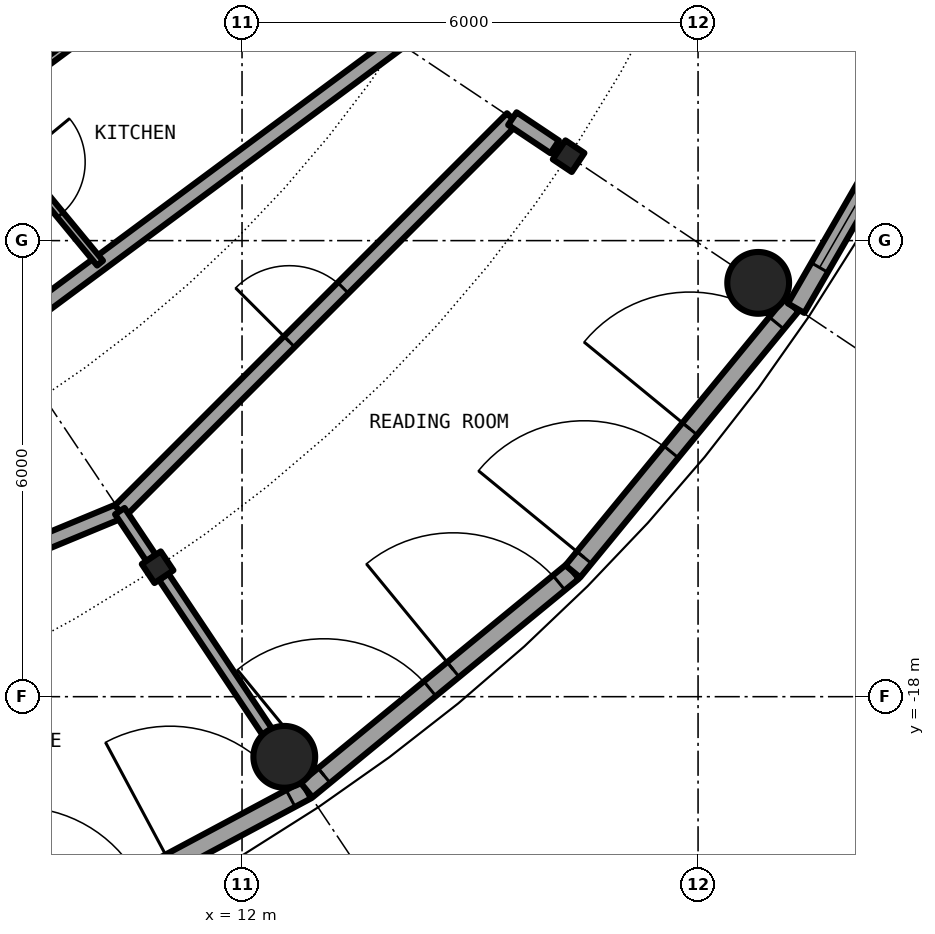
"""IFC4 building model, lengths in metres.
Left out: names, types, materials, properties, quantities, classifications, styles, units other than length and angle.
Written with IfcOpenShell. Run it as: python <this file> out.ifc"""

import sys

from ifc_helpers import new_model, si_unit, direction, frame, frame_2d, origin, origin_2d, place, context, subcontext, project, spatial, rectangle, hollow_circle, i_section, extrude, element, fill, save


model = new_model("IFC4")
c1 = context("Model", 3, precision=1e-05, world=origin(), true_north=direction((0.0, 1.0)))
c2 = subcontext(c1, "Body", "Model", "MODEL_VIEW")
j1 = project(units=[si_unit("LENGTHUNIT", "METRE"), si_unit("PLANEANGLEUNIT", "RADIAN")], contexts=[c1])
p1 = place(None, origin())
s1 = spatial("IfcSite", under=j1, at=p1, CompositionType="ELEMENT")
p2 = place(p1, origin())
s2 = spatial("IfcBuilding", under=s1, at=p2, CompositionType="ELEMENT")
p3 = place(p2, frame((0.0, 0.0, 249.3)))
s3 = spatial("IfcBuildingStorey", under=s2, at=p3, CompositionType="ELEMENT", Elevation=249.3)
for number, where, z_axis, x_axis in (
    (1, (12.556, -18.791, 0.0), (0.0, 0.0, 1.0), (1.0, 0.0, 0.0)),
    (2, (18.791, -12.556, 0.0), (0.0, 0.0, 1.0), (1.0, 0.0, 0.0)),
):
    element("IfcColumn", number, at=place(p3, frame(where, z_axis=z_axis, x_axis=x_axis)), inside=s3, PredefinedType="COLUMN", context=c2, shape_type="SweptSolid", body=[
        extrude(hollow_circle(Radius=0.406, WallThickness=0.03, at=origin_2d()), origin(), (0.0, 0.0, 1.0), 3.05),
    ])
for number, where, z_axis, x_axis in (
    (3, (10.889, -16.297, 0.0), (0.0, 0.0, 1.0), (0.556, -0.831, 0.0)),
    (4, (16.297, -10.889, 0.0), (0.0, 0.0, 1.0), (0.831, -0.556, 0.0)),
):
    element("IfcColumn", number, at=place(p3, frame(where, z_axis=z_axis, x_axis=x_axis)), inside=s3, PredefinedType="COLUMN", context=c2, shape_type="SweptSolid", body=[
        extrude(i_section(OverallWidth=0.3, OverallDepth=0.3, WebThickness=0.011, FlangeThickness=0.019, FilletRadius=0.027, at=origin_2d()), origin(), (0.0, 0.0, 1.0), 3.05),
    ])
p4 = place(p3, frame((8.85, -21.365, 0.0), z_axis=(0.0, 0.0, 1.0), x_axis=(0.881912752543, 0.471412660947, 0.0)))
e5 = element("IfcWall", 5, at=p4, inside=s3, PredefinedType="SOLIDWALL", context=c2, shape_type="SweptSolid", body=[
    extrude(rectangle(XDim=4.533, YDim=0.25, at=frame_2d((2.267, 0.0))), origin(), (0.0, 0.0, 1.0), 2.7),
])
p5 = place(p4, frame((0.236, 0.0, 0.0)))
e6 = element("IfcOpeningElement", 6, at=p5, cuts=e5, PredefinedType="OPENING", context=c2, shape_type="SweptSolid", body=[
    extrude(rectangle(XDim=1.8, YDim=2.2, at=frame_2d((0.9, 1.1))), frame((0.0, 0.135, 0.0), z_axis=(0.0, -1.0, 0.0), x_axis=(1.0, 0.0, 0.0)), (0.0, 0.0, 1.0), 0.27),
])
p6 = place(p4, frame((2.497, 0.0, 0.0)))
e7 = element("IfcOpeningElement", 7, at=p6, cuts=e5, PredefinedType="OPENING", context=c2, shape_type="SweptSolid", body=[
    extrude(rectangle(XDim=1.8, YDim=2.2, at=frame_2d((0.9, 1.1))), frame((0.0, 0.135, 0.0), z_axis=(0.0, -1.0, 0.0), x_axis=(1.0, 0.0, 0.0)), (0.0, 0.0, 1.0), 0.27),
])
p7 = place(p3, frame((12.848, -19.228, 0.0), z_axis=(0.0, 0.0, 1.0), x_axis=(0.772989395532, 0.634418942337, 0.0)))
e8 = element("IfcWall", 8, at=p7, inside=s3, PredefinedType="SOLIDWALL", context=c2, shape_type="SweptSolid", body=[
    extrude(rectangle(XDim=4.533, YDim=0.25, at=frame_2d((2.267, 0.0))), origin(), (0.0, 0.0, 1.0), 2.7),
])
p8 = place(p7, frame((0.3, 0.0, 0.0)))
e9 = element("IfcOpeningElement", 9, at=p8, cuts=e8, PredefinedType="OPENING", context=c2, shape_type="SweptSolid", body=[
    extrude(rectangle(XDim=1.8, YDim=2.2, at=frame_2d((0.9, 1.1))), frame((0.0, 0.135, 0.0), z_axis=(0.0, -1.0, 0.0), x_axis=(1.0, 0.0, 0.0)), (0.0, 0.0, 1.0), 0.27),
])
p9 = place(p7, frame((2.497, 0.0, 0.0)))
e10 = element("IfcOpeningElement", 10, at=p9, cuts=e8, PredefinedType="OPENING", context=c2, shape_type="SweptSolid", body=[
    extrude(rectangle(XDim=1.8, YDim=2.2, at=frame_2d((0.9, 1.1))), frame((0.0, 0.135, 0.0), z_axis=(0.0, -1.0, 0.0), x_axis=(1.0, 0.0, 0.0)), (0.0, 0.0, 1.0), 0.27),
])
p10 = place(p3, frame((16.352, -16.352, 0.0), z_axis=(0.0, 0.0, 1.0), x_axis=(0.634418942337, 0.772989395532, 0.0)))
e11 = element("IfcWall", 11, at=p10, inside=s3, PredefinedType="SOLIDWALL", context=c2, shape_type="SweptSolid", body=[
    extrude(rectangle(XDim=4.533, YDim=0.25, at=frame_2d((2.267, 0.0))), origin(), (0.0, 0.0, 1.0), 2.7),
])
p11 = place(p10, frame((0.236, 0.0, 0.0)))
e12 = element("IfcOpeningElement", 12, at=p11, cuts=e11, PredefinedType="OPENING", context=c2, shape_type="SweptSolid", body=[
    extrude(rectangle(XDim=1.8, YDim=2.2, at=frame_2d((0.9, 1.1))), frame((0.0, 0.135, 0.0), z_axis=(0.0, -1.0, 0.0), x_axis=(1.0, 0.0, 0.0)), (0.0, 0.0, 1.0), 0.27),
])
p12 = place(p10, frame((2.427, 0.0, 0.0)))
e13 = element("IfcOpeningElement", 13, at=p12, cuts=e11, PredefinedType="OPENING", context=c2, shape_type="SweptSolid", body=[
    extrude(rectangle(XDim=1.8, YDim=2.2, at=frame_2d((0.9, 1.1))), frame((0.0, 0.135, 0.0), z_axis=(0.0, -1.0, 0.0), x_axis=(1.0, 0.0, 0.0)), (0.0, 0.0, 1.0), 0.27),
])
p13 = place(p3, frame((19.29, -12.889, 0.0), z_axis=(0.0, 0.0, 1.0), x_axis=(0.499903546559, 0.866081084043, 0.0)))
e14 = element("IfcWall", 14, at=p13, inside=s3, PredefinedType="SOLIDWALL", context=c2, shape_type="SweptSolid", body=[
    extrude(rectangle(XDim=3.034, YDim=0.25, at=frame_2d((1.517, 0.0))), origin(), (0.0, 0.0, 1.0), 2.7),
])
p14 = place(p13, frame((0.617, 0.0, 0.3)))
e15 = element("IfcOpeningElement", 15, at=p14, cuts=e14, PredefinedType="OPENING", context=c2, shape_type="SweptSolid", body=[
    extrude(rectangle(XDim=1.8, YDim=2.1, at=frame_2d((0.9, 1.05))), frame((0.0, 0.135, 0.0), z_axis=(0.0, -1.0, 0.0), x_axis=(1.0, 0.0, 0.0)), (0.0, 0.0, 1.0), 0.27),
])
p15 = place(p3, frame((3.65, -18.351, 0.0), z_axis=(0.0, 0.0, 1.0), x_axis=(0.923866436038, 0.382715048518, 0.0)))
e16 = element("IfcWall", 16, at=p15, inside=s3, PredefinedType="PARTITIONING", context=c2, shape_type="SweptSolid", body=[
    extrude(rectangle(XDim=7.301, YDim=0.2, at=frame_2d((3.65, 0.0))), origin(), (0.0, 0.0, 1.0), 2.7),
])
p16 = place(p15, frame((3.15, 0.0, 0.0)))
e17 = element("IfcOpeningElement", 17, at=p16, cuts=e16, PredefinedType="OPENING", context=c2, shape_type="SweptSolid", body=[
    extrude(rectangle(XDim=1.0, YDim=2.3, at=frame_2d((0.5, 1.15))), frame((0.0, 0.11, 0.0), z_axis=(0.0, -1.0, 0.0), x_axis=(1.0, 0.0, 0.0)), (0.0, 0.0, 1.0), 0.22),
])
p17 = place(p3, frame((10.395, -15.557, 0.0), z_axis=(0.0, 0.0, 1.0), x_axis=(0.707106781187, 0.707106781187, 0.0)))
e18 = element("IfcWall", 18, at=p17, inside=s3, PredefinedType="PARTITIONING", context=c2, shape_type="SweptSolid", body=[
    extrude(rectangle(XDim=7.3, YDim=0.2, at=frame_2d((3.65, 0.0))), origin(), (0.0, 0.0, 1.0), 2.7),
])
p18 = place(p17, frame((3.15, 0.0, 0.0)))
e19 = element("IfcOpeningElement", 19, at=p18, cuts=e18, PredefinedType="OPENING", context=c2, shape_type="SweptSolid", body=[
    extrude(rectangle(XDim=1.0, YDim=2.3, at=frame_2d((0.5, 1.15))), frame((0.0, 0.11, 0.0), z_axis=(0.0, -1.0, 0.0), x_axis=(1.0, 0.0, 0.0)), (0.0, 0.0, 1.0), 0.22),
])
p19 = place(p3, frame((4.906, -16.172, 0.0), z_axis=(0.0, 0.0, 1.0), x_axis=(0.803204584823, 0.59570327758, 0.0)))
e20 = element("IfcWall", 20, at=p19, inside=s3, PredefinedType="PARTITIONING", context=c2, shape_type="SweptSolid", body=[
    extrude(rectangle(XDim=11.387, YDim=0.2, at=frame_2d((5.693, 0.0))), origin(), (0.0, 0.0, 1.0), 2.7),
])
p20 = place(p19, frame((4.38, 0.0, 0.0)))
e21 = element("IfcOpeningElement", 21, at=p20, cuts=e20, PredefinedType="OPENING", context=c2, shape_type="SweptSolid", body=[
    extrude(rectangle(XDim=1.0, YDim=2.3, at=frame_2d((0.5, 1.15))), frame((0.0, 0.11, 0.0), z_axis=(0.0, -1.0, 0.0), x_axis=(1.0, 0.0, 0.0)), (0.0, 0.0, 1.0), 0.22),
])
p21 = place(p3, frame((8.513, -10.332, 0.0), z_axis=(0.0, 0.0, 1.0), x_axis=(0.803224407806, 0.595676548728, 0.0)))
e22 = element("IfcWall", 22, at=p21, inside=s3, PredefinedType="PARTITIONING", context=c2, shape_type="SweptSolid", body=[
    extrude(rectangle(XDim=2.236, YDim=0.1, at=frame_2d((1.118, 0.0))), origin(), (0.0, 0.0, 1.0), 2.7),
])
p22 = place(p3, frame((4.908, -5.959, 0.0), z_axis=(0.0, 0.0, 1.0), x_axis=(0.636105207978, -0.771602335652, 0.0)))
e23 = element("IfcWall", 23, at=p22, inside=s3, PredefinedType="PARTITIONING", context=c2, shape_type="SweptSolid", body=[
    extrude(rectangle(XDim=8.213, YDim=0.1, at=frame_2d((4.106, 0.0))), origin(), (0.0, 0.0, 1.0), 2.7),
])
p23 = place(p22, frame((6.49, 0.0, 0.0)))
e24 = element("IfcOpeningElement", 24, at=p23, cuts=e23, PredefinedType="OPENING", context=c2, shape_type="SweptSolid", body=[
    extrude(rectangle(XDim=0.9, YDim=2.3, at=frame_2d((0.45, 1.15))), frame((0.0, 0.06, 0.0), z_axis=(0.0, -1.0, 0.0), x_axis=(1.0, 0.0, 0.0)), (0.0, 0.0, 1.0), 0.12),
])
p24 = place(p22, frame((2.384, 0.0, 0.0)))
e25 = element("IfcOpeningElement", 25, at=p24, cuts=e23, PredefinedType="OPENING", context=c2, shape_type="SweptSolid", body=[
    extrude(rectangle(XDim=0.9, YDim=2.3, at=frame_2d((0.45, 1.15))), frame((0.0, 0.06, 0.0), z_axis=(0.0, -1.0, 0.0), x_axis=(1.0, 0.0, 0.0)), (0.0, 0.0, 1.0), 0.12),
])
p25 = place(p3, frame((10.392, -15.559, 0.0), z_axis=(0.0, 0.0, 1.0), x_axis=(0.555537830231, -0.831491262241, 0.0)))
e26 = element("IfcWall", 26, at=p25, inside=s3, PredefinedType="PARTITIONING", context=c2, shape_type="SweptSolid", body=[
    extrude(rectangle(XDim=0.74, YDim=0.15, at=frame_2d((0.37, 0.0))), origin(), (0.0, 0.0, 1.0), 2.7),
])
p26 = place(p3, frame((10.97, -16.423, 0.0), z_axis=(0.0, 0.0, 1.0), x_axis=(0.555504160879, -0.831513756498, 0.0)))
e27 = element("IfcWall", 27, at=p26, inside=s3, PredefinedType="PARTITIONING", context=c2, shape_type="SweptSolid", body=[
    extrude(rectangle(XDim=2.452, YDim=0.15, at=frame_2d((1.226, 0.0))), origin(), (0.0, 0.0, 1.0), 2.7),
])
p27 = place(p3, frame((15.557, -10.395, 0.0), z_axis=(0.0, 0.0, 1.0), x_axis=(0.831601508083, -0.555372786292, 0.0)))
e28 = element("IfcWall", 28, at=p27, inside=s3, PredefinedType="PARTITIONING", context=c2, shape_type="SweptSolid", body=[
    extrude(rectangle(XDim=0.67, YDim=0.2, at=frame_2d((0.335, 0.0))), origin(), (0.0, 0.0, 1.0), 2.7),
])
p28 = place(p6, origin())
e29 = element("IfcDoor", 29, at=p28, inside=s3, OperationType="SINGLE_SWING_LEFT", PredefinedType="DOOR", context=c2, shape_type="SweptSolid", body=[
    extrude(rectangle(XDim=1.8, YDim=2.2, at=frame_2d((0.9, 1.1))), frame((0.0, 0.025, 0.0), z_axis=(0.0, -1.0, 0.0), x_axis=(1.0, 0.0, 0.0)), (0.0, 0.0, 1.0), 0.05),
])
fill(e7, e29)
p29 = place(p8, origin())
e30 = element("IfcDoor", 30, at=p29, inside=s3, OperationType="SINGLE_SWING_LEFT", PredefinedType="DOOR", context=c2, shape_type="SweptSolid", body=[
    extrude(rectangle(XDim=1.8, YDim=2.2, at=frame_2d((0.9, 1.1))), frame((0.0, 0.025, 0.0), z_axis=(0.0, -1.0, 0.0), x_axis=(1.0, 0.0, 0.0)), (0.0, 0.0, 1.0), 0.05),
])
fill(e9, e30)
p30 = place(p9, origin())
e31 = element("IfcDoor", 31, at=p30, inside=s3, OperationType="SINGLE_SWING_LEFT", PredefinedType="DOOR", context=c2, shape_type="SweptSolid", body=[
    extrude(rectangle(XDim=1.8, YDim=2.2, at=frame_2d((0.9, 1.1))), frame((0.0, 0.025, 0.0), z_axis=(0.0, -1.0, 0.0), x_axis=(1.0, 0.0, 0.0)), (0.0, 0.0, 1.0), 0.05),
])
fill(e10, e31)
p31 = place(p11, origin())
e32 = element("IfcDoor", 32, at=p31, inside=s3, OperationType="SINGLE_SWING_LEFT", PredefinedType="DOOR", context=c2, shape_type="SweptSolid", body=[
    extrude(rectangle(XDim=1.8, YDim=2.2, at=frame_2d((0.9, 1.1))), frame((0.0, 0.025, 0.0), z_axis=(0.0, -1.0, 0.0), x_axis=(1.0, 0.0, 0.0)), (0.0, 0.0, 1.0), 0.05),
])
fill(e12, e32)
p32 = place(p12, origin())
e33 = element("IfcDoor", 33, at=p32, inside=s3, OperationType="SINGLE_SWING_LEFT", PredefinedType="DOOR", context=c2, shape_type="SweptSolid", body=[
    extrude(rectangle(XDim=1.8, YDim=2.2, at=frame_2d((0.9, 1.1))), frame((0.0, 0.025, 0.0), z_axis=(0.0, -1.0, 0.0), x_axis=(1.0, 0.0, 0.0)), (0.0, 0.0, 1.0), 0.05),
])
fill(e13, e33)
p33 = place(p14, origin())
e34 = element("IfcWindow", 34, at=p33, inside=s3, PartitioningType="SINGLE_PANEL", PredefinedType="WINDOW", context=c2, shape_type="SweptSolid", body=[
    extrude(rectangle(XDim=1.8, YDim=2.1, at=frame_2d((0.9, 1.05))), frame((0.0, 0.03, 0.0), z_axis=(0.0, -1.0, 0.0), x_axis=(1.0, 0.0, 0.0)), (0.0, 0.0, 1.0), 0.06),
])
fill(e15, e34)
p34 = place(p18, origin())
e35 = element("IfcDoor", 35, at=p34, inside=s3, OperationType="SINGLE_SWING_LEFT", PredefinedType="DOOR", context=c2, shape_type="SweptSolid", body=[
    extrude(rectangle(XDim=1.0, YDim=2.3, at=frame_2d((0.5, 1.15))), frame((0.0, 0.025, 0.0), z_axis=(0.0, -1.0, 0.0), x_axis=(1.0, 0.0, 0.0)), (0.0, 0.0, 1.0), 0.05),
])
fill(e19, e35)
p35 = place(p23, origin())
e36 = element("IfcDoor", 36, at=p35, inside=s3, OperationType="SINGLE_SWING_RIGHT", PredefinedType="DOOR", context=c2, shape_type="SweptSolid", body=[
    extrude(rectangle(XDim=0.9, YDim=2.3, at=frame_2d((0.45, 1.15))), frame((0.0, 0.025, 0.0), z_axis=(0.0, -1.0, 0.0), x_axis=(1.0, 0.0, 0.0)), (0.0, 0.0, 1.0), 0.05),
])
fill(e24, e36)
save(model, sys.argv[1])
